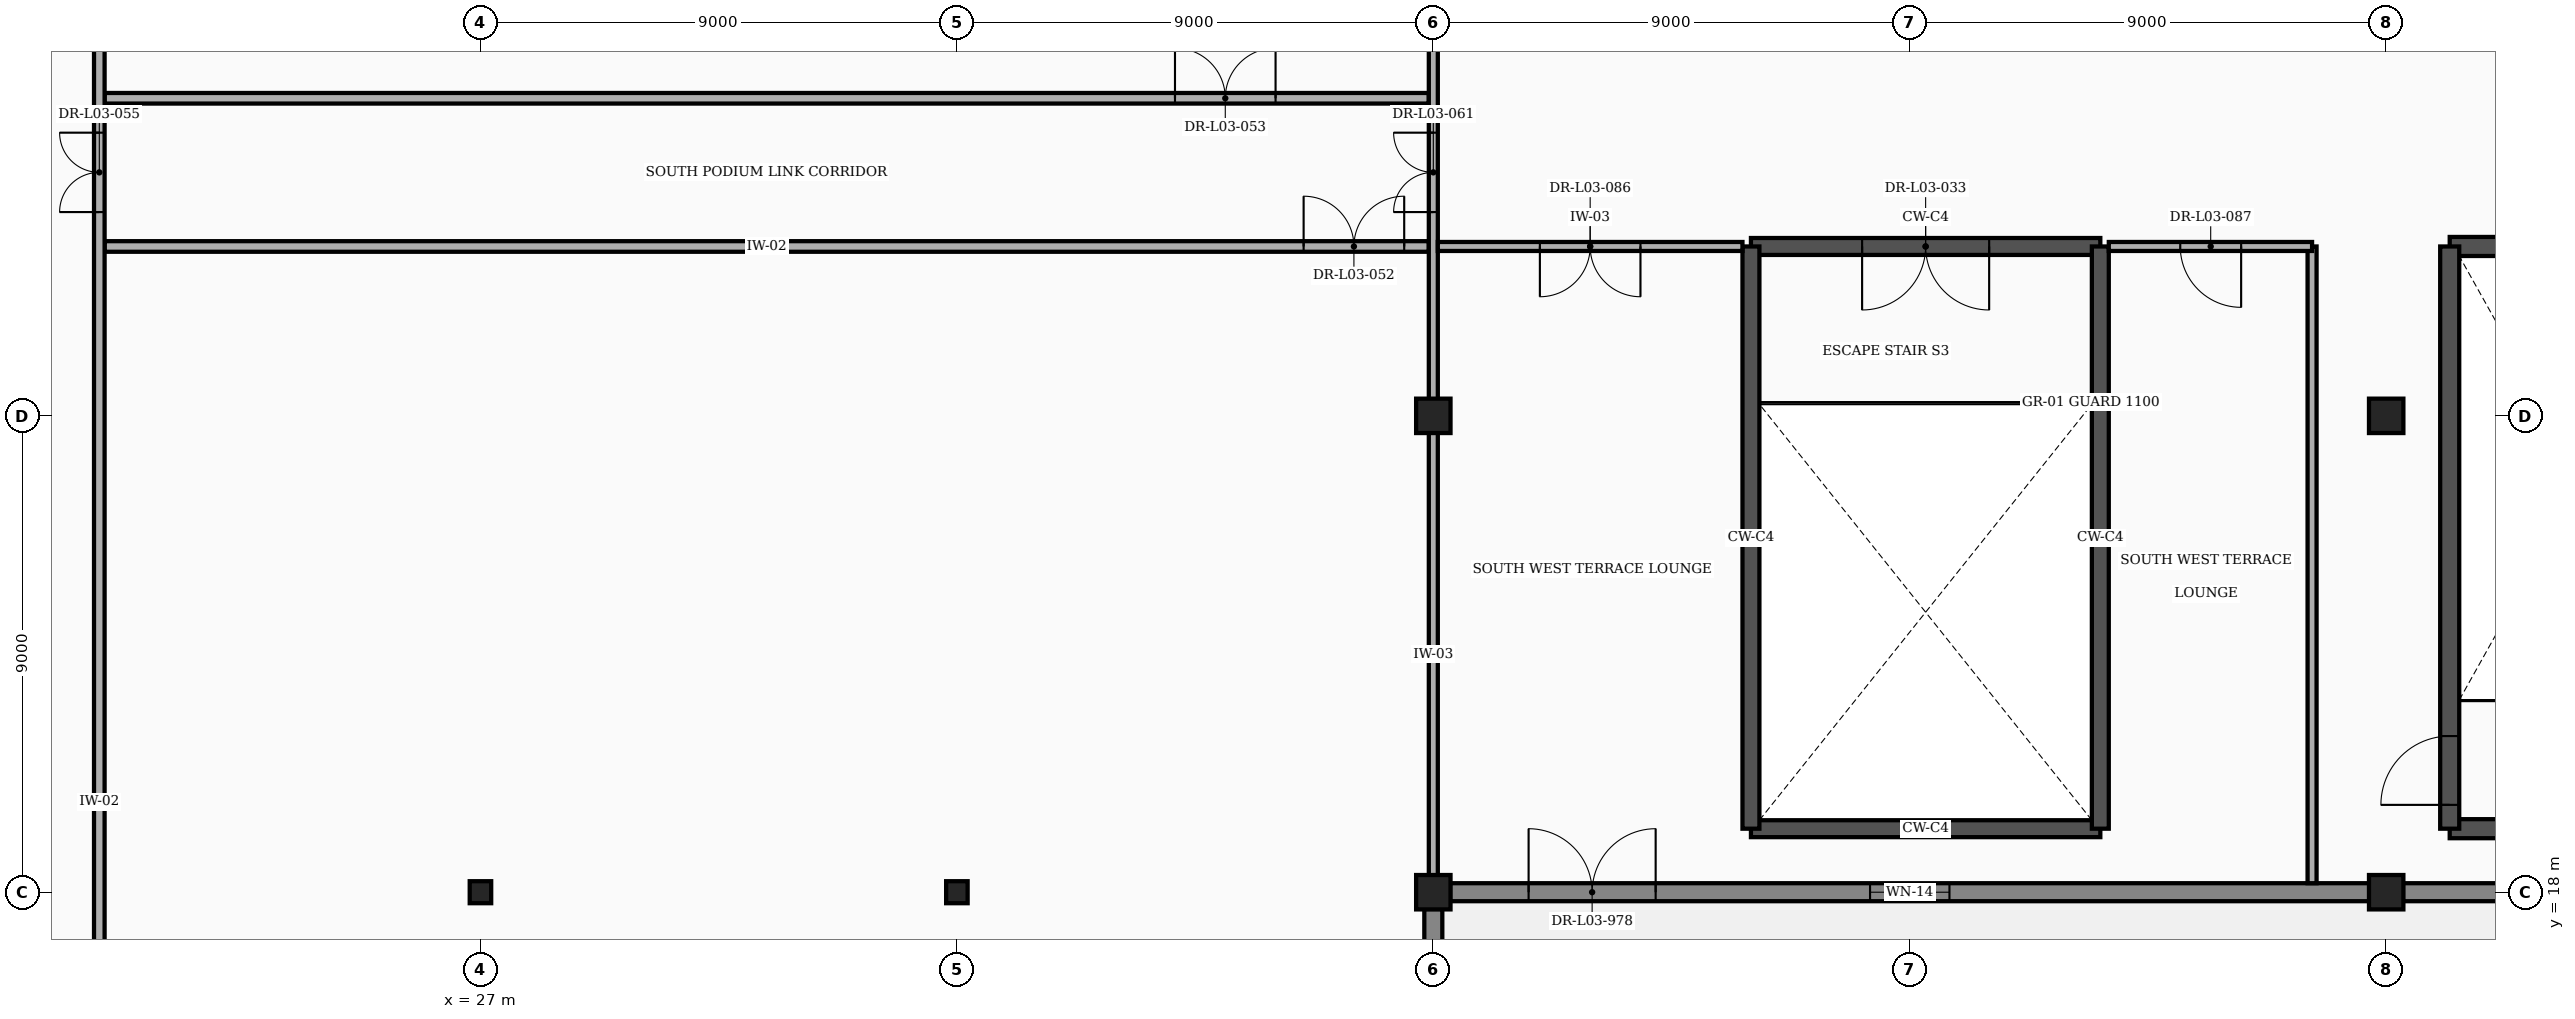
"""IFC4 building model, lengths in metres.
Left out: names, types, materials, properties, quantities, classifications, styles, units other than length and angle.
Written with IfcOpenShell. Run it as: python <this file> out.ifc"""

import sys

from ifc_helpers import new_model, si_unit, direction, frame, frame_2d, origin, origin_2d, place, context, subcontext, project, spatial, rectangle, i_section, extrude, element, fill, save


model = new_model("IFC4")
c1 = context("Model", 3, precision=1e-05, world=origin(), true_north=direction((0.0, 1.0)))
c2 = subcontext(c1, "Body", "Model", "MODEL_VIEW")
j1 = project(units=[si_unit("LENGTHUNIT", "METRE"), si_unit("PLANEANGLEUNIT", "RADIAN")], contexts=[c1])
p1 = place(None, origin())
s1 = spatial("IfcSite", under=j1, at=p1, CompositionType="ELEMENT")
p2 = place(p1, origin())
s2 = spatial("IfcBuilding", under=s1, at=p2, CompositionType="ELEMENT")
p3 = place(p2, frame((0.0, 0.0, 16.8)))
s3 = spatial("IfcBuildingStorey", under=s2, at=p3, CompositionType="ELEMENT", Elevation=16.8)
for number, where, z_axis, x_axis in (
    (1, (27.0, 18.0, 0.0), (0.0, 0.0, 1.0), (1.0, 0.0, 0.0)),
    (2, (36.0, 18.0, 0.0), (0.0, 0.0, 1.0), (1.0, 0.0, 0.0)),
):
    element("IfcColumn", number, at=place(p3, frame(where, z_axis=z_axis, x_axis=x_axis)), inside=s3, PredefinedType="COLUMN", context=c2, shape_type="SweptSolid", body=[
        extrude(i_section(OverallWidth=0.406, OverallDepth=0.416, WebThickness=0.03, FlangeThickness=0.048, at=origin_2d()), origin(), (0.0, 0.0, 1.0), 4.8),
    ])
for number, where, z_axis, x_axis in (
    (3, (45.0, 18.0, 0.0), (0.0, 0.0, 1.0), (1.0, 0.0, 0.0)),
    (4, (45.0, 27.0, 0.0), (0.0, 0.0, 1.0), (1.0, 0.0, 0.0)),
    (5, (63.0, 18.0, 0.0), (0.0, 0.0, 1.0), (1.0, 0.0, 0.0)),
    (6, (63.0, 27.0, 0.0), (0.0, 0.0, 1.0), (1.0, 0.0, 0.0)),
):
    element("IfcColumn", number, at=place(p3, frame(where, z_axis=z_axis, x_axis=x_axis)), inside=s3, PredefinedType="COLUMN", context=c2, shape_type="SweptSolid", body=[
        extrude(rectangle(XDim=0.65, YDim=0.65, at=origin_2d()), origin(), (0.0, 0.0, 1.0), 4.8),
    ])
p4 = place(p3, frame((45.317, 18.0, 0.0), z_axis=(0.0, 0.0, 1.0), x_axis=(1.0, 0.0, 0.0)))
e7 = element("IfcWall", 7, at=p4, inside=s3, PredefinedType="STANDARD", context=c2, shape_type="SweptSolid", body=[
    extrude(rectangle(XDim=17.366, YDim=0.34, at=frame_2d((8.683, 0.0))), origin(), (0.0, 0.0, 1.0), 4.195),
])
p5 = place(p4, frame((7.933, 0.0, 0.85)))
e8 = element("IfcOpeningElement", 8, at=p5, cuts=e7, PredefinedType="OPENING", context=c2, shape_type="SweptSolid", body=[
    extrude(rectangle(XDim=1.5, YDim=1.8, at=frame_2d((0.75, 0.9))), frame((0.0, 0.182, 0.0), z_axis=(0.0, -1.0, 0.0), x_axis=(1.0, 0.0, 0.0)), (0.0, 0.0, 1.0), 0.364),
])
p6 = place(p4, frame((1.483, 0.0, 0.0)))
e9 = element("IfcOpeningElement", 9, at=p6, cuts=e7, PredefinedType="OPENING", context=c2, shape_type="SweptSolid", body=[
    extrude(rectangle(XDim=2.4, YDim=2.35, at=frame_2d((1.2, 1.175))), frame((0.0, 0.182, 0.0), z_axis=(0.0, -1.0, 0.0), x_axis=(1.0, 0.0, 0.0)), (0.0, 0.0, 1.0), 0.364),
])
p7 = place(p3, frame((63.317, 18.0, 0.0), z_axis=(0.0, 0.0, 1.0), x_axis=(1.0, 0.0, 0.0)))
e10 = element("IfcWall", 10, at=p7, inside=s3, PredefinedType="STANDARD", context=c2, shape_type="SweptSolid", body=[
    extrude(rectangle(XDim=17.366, YDim=0.34, at=frame_2d((8.683, 0.0))), origin(), (0.0, 0.0, 1.0), 4.195),
])
p8 = place(p7, frame((7.783, 0.0, 0.0)))
e11 = element("IfcOpeningElement", 11, at=p8, cuts=e10, PredefinedType="OPENING", context=c2, shape_type="SweptSolid", body=[
    extrude(rectangle(XDim=1.8, YDim=2.3, at=frame_2d((0.9, 1.15))), frame((0.0, 0.182, 0.0), z_axis=(0.0, -1.0, 0.0), x_axis=(1.0, 0.0, 0.0)), (0.0, 0.0, 1.0), 0.364),
])
p9 = place(p7, frame((11.433, 0.0, 0.0)))
e12 = element("IfcOpeningElement", 12, at=p9, cuts=e10, PredefinedType="OPENING", context=c2, shape_type="SweptSolid", body=[
    extrude(rectangle(XDim=4.5, YDim=2.5, at=frame_2d((2.25, 1.25))), frame((0.0, 0.182, 0.0), z_axis=(0.0, -1.0, 0.0), x_axis=(1.0, 0.0, 0.0)), (0.0, 0.0, 1.0), 0.364),
])
p10 = place(p3, frame((45.0, 9.317, 0.0), z_axis=(0.0, 0.0, 1.0), x_axis=(0.0, 1.0, 0.0)))
e13 = element("IfcWall", 13, at=p10, inside=s3, PredefinedType="STANDARD", context=c2, shape_type="SweptSolid", body=[
    extrude(rectangle(XDim=8.366, YDim=0.34, at=frame_2d((4.183, 0.0))), origin(), (0.0, 0.0, 1.0), 4.555),
])
p11 = place(p10, frame((2.883, 0.0, 0.85)))
e14 = element("IfcOpeningElement", 14, at=p11, cuts=e13, PredefinedType="OPENING", context=c2, shape_type="SweptSolid", body=[
    extrude(rectangle(XDim=2.6, YDim=2.2, at=frame_2d((1.3, 1.1))), frame((0.0, 0.182, 0.0), z_axis=(0.0, -1.0, 0.0), x_axis=(1.0, 0.0, 0.0)), (0.0, 0.0, 1.0), 0.364),
])
for number, where, z_axis, x_axis in (
    (15, (64.2, 19.2, 0.0), (0.0, 0.0, 1.0), (1.0, 0.0, 0.0)),
    (16, (64.2, 30.2, 0.0), (0.0, 0.0, 1.0), (1.0, 0.0, 0.0)),
):
    element("IfcWall", number, at=place(p3, frame(where, z_axis=z_axis, x_axis=x_axis)), inside=s3, PredefinedType="SHEAR", context=c2, shape_type="SweptSolid", body=[
        extrude(rectangle(XDim=6.6, YDim=0.36, at=frame_2d((3.3, 0.0))), origin(), (0.0, 0.0, 1.0), 4.555),
    ])
p12 = place(p3, frame((64.2, 19.2, 0.0), z_axis=(0.0, 0.0, 1.0), x_axis=(0.0, 1.0, 0.0)))
e17 = element("IfcWall", 17, at=p12, inside=s3, PredefinedType="SHEAR", context=c2, shape_type="SweptSolid", body=[
    extrude(rectangle(XDim=11.0, YDim=0.36, at=frame_2d((5.5, 0.0))), origin(), (0.0, 0.0, 1.0), 4.555),
])
p13 = place(p12, frame((0.45, 0.0, 0.0)))
e18 = element("IfcOpeningElement", 18, at=p13, cuts=e17, PredefinedType="OPENING", context=c2, shape_type="SweptSolid", body=[
    extrude(rectangle(XDim=1.3, YDim=2.2, at=frame_2d((0.65, 1.1))), frame((0.0, 0.192, 0.0), z_axis=(0.0, -1.0, 0.0), x_axis=(1.0, 0.0, 0.0)), (0.0, 0.0, 1.0), 0.384),
])
p14 = place(p3, frame((51.0, 19.2, 0.0), z_axis=(0.0, 0.0, 1.0), x_axis=(1.0, 0.0, 0.0)))
e19 = element("IfcWall", 19, at=p14, inside=s3, PredefinedType="SHEAR", context=c2, shape_type="SweptSolid", body=[
    extrude(rectangle(XDim=6.6, YDim=0.32, at=frame_2d((3.3, 0.0))), origin(), (0.0, 0.0, 1.0), 4.555),
])
p15 = place(p3, frame((51.0, 30.2, 0.0), z_axis=(0.0, 0.0, 1.0), x_axis=(1.0, 0.0, 0.0)))
e20 = element("IfcWall", 20, at=p15, inside=s3, PredefinedType="SHEAR", context=c2, shape_type="SweptSolid", body=[
    extrude(rectangle(XDim=6.6, YDim=0.32, at=frame_2d((3.3, 0.0))), origin(), (0.0, 0.0, 1.0), 4.555),
])
p16 = place(p15, frame((2.1, 0.0, 0.0)))
e21 = element("IfcOpeningElement", 21, at=p16, cuts=e20, PredefinedType="OPENING", context=c2, shape_type="SweptSolid", body=[
    extrude(rectangle(XDim=2.4, YDim=2.25, at=frame_2d((1.2, 1.125))), frame((0.0, 0.172, 0.0), z_axis=(0.0, -1.0, 0.0), x_axis=(1.0, 0.0, 0.0)), (0.0, 0.0, 1.0), 0.344),
])
for number, where, z_axis, x_axis in (
    (22, (51.0, 19.2, 0.0), (0.0, 0.0, 1.0), (0.0, 1.0, 0.0)),
    (23, (57.6, 19.2, 0.0), (0.0, 0.0, 1.0), (0.0, 1.0, 0.0)),
):
    element("IfcWall", number, at=place(p3, frame(where, z_axis=z_axis, x_axis=x_axis)), inside=s3, PredefinedType="SHEAR", context=c2, shape_type="SweptSolid", body=[
        extrude(rectangle(XDim=11.0, YDim=0.32, at=frame_2d((5.5, 0.0))), origin(), (0.0, 0.0, 1.0), 4.555),
    ])
p17 = place(p3, frame((19.9, 30.2, 0.0), z_axis=(0.0, 0.0, 1.0), x_axis=(1.0, 0.0, 0.0)))
e24 = element("IfcWall", 24, at=p17, inside=s3, PredefinedType="PARTITIONING", context=c2, shape_type="SweptSolid", body=[
    extrude(rectangle(XDim=25.015, YDim=0.2, at=frame_2d((12.508, 0.0))), origin(), (0.0, 0.0, 1.0), 4.555),
])
p18 = place(p17, frame((22.65, 0.0, 0.0)))
e25 = element("IfcOpeningElement", 25, at=p18, cuts=e24, PredefinedType="OPENING", context=c2, shape_type="SweptSolid", body=[
    extrude(rectangle(XDim=1.9, YDim=2.35, at=frame_2d((0.95, 1.175))), frame((0.0, 0.112, 0.0), z_axis=(0.0, -1.0, 0.0), x_axis=(1.0, 0.0, 0.0)), (0.0, 0.0, 1.0), 0.224),
])
p19 = place(p3, frame((19.9, 33.0, 0.0), z_axis=(0.0, 0.0, 1.0), x_axis=(1.0, 0.0, 0.0)))
e26 = element("IfcWall", 26, at=p19, inside=s3, PredefinedType="PARTITIONING", context=c2, shape_type="SweptSolid", body=[
    extrude(rectangle(XDim=25.015, YDim=0.2, at=frame_2d((12.508, 0.0))), origin(), (0.0, 0.0, 1.0), 4.555),
])
p20 = place(p19, frame((20.22, 0.0, 0.0)))
e27 = element("IfcOpeningElement", 27, at=p20, cuts=e26, PredefinedType="OPENING", context=c2, shape_type="SweptSolid", body=[
    extrude(rectangle(XDim=1.9, YDim=2.35, at=frame_2d((0.95, 1.175))), frame((0.0, 0.112, 0.0), z_axis=(0.0, -1.0, 0.0), x_axis=(1.0, 0.0, 0.0)), (0.0, 0.0, 1.0), 0.224),
])
p21 = place(p3, frame((19.8, 0.17, 0.0), z_axis=(0.0, 0.0, 1.0), x_axis=(0.0, 1.0, 0.0)))
e28 = element("IfcWall", 28, at=p21, inside=s3, PredefinedType="PARTITIONING", context=c2, shape_type="SweptSolid", body=[
    extrude(rectangle(XDim=39.07, YDim=0.2, at=frame_2d((19.535, 0.0))), origin(), (0.0, 0.0, 1.0), 4.555),
])
p22 = place(p21, frame((13.98, 0.0, 0.0)))
e29 = element("IfcOpeningElement", 29, at=p22, cuts=e28, PredefinedType="OPENING", context=c2, shape_type="SweptSolid", body=[
    extrude(rectangle(XDim=1.9, YDim=2.35, at=frame_2d((0.95, 1.175))), frame((0.0, 0.112, 0.0), z_axis=(0.0, -1.0, 0.0), x_axis=(1.0, 0.0, 0.0)), (0.0, 0.0, 1.0), 0.224),
])
p23 = place(p21, frame((30.68, 0.0, 0.0)))
e30 = element("IfcOpeningElement", 30, at=p23, cuts=e28, PredefinedType="OPENING", context=c2, shape_type="SweptSolid", body=[
    extrude(rectangle(XDim=1.5, YDim=2.2, at=frame_2d((0.75, 1.1))), frame((0.0, 0.112, 0.0), z_axis=(0.0, -1.0, 0.0), x_axis=(1.0, 0.0, 0.0)), (0.0, 0.0, 1.0), 0.224),
])
p24 = place(p21, frame((36.68, 0.0, 0.0)))
e31 = element("IfcOpeningElement", 31, at=p24, cuts=e28, PredefinedType="OPENING", context=c2, shape_type="SweptSolid", body=[
    extrude(rectangle(XDim=1.9, YDim=2.35, at=frame_2d((0.95, 1.175))), frame((0.0, 0.112, 0.0), z_axis=(0.0, -1.0, 0.0), x_axis=(1.0, 0.0, 0.0)), (0.0, 0.0, 1.0), 0.224),
])
p25 = place(p3, frame((45.0, 18.22, 0.0), z_axis=(0.0, 0.0, 1.0), x_axis=(0.0, 1.0, 0.0)))
e32 = element("IfcWall", 32, at=p25, inside=s3, PredefinedType="PARTITIONING", context=c2, shape_type="SweptSolid", body=[
    extrude(rectangle(XDim=8.56, YDim=0.17, at=frame_2d((4.28, 0.0))), origin(), (0.0, 0.0, 1.0), 4.002),
])
p26 = place(p3, frame((45.0, 27.22, 0.0), z_axis=(0.0, 0.0, 1.0), x_axis=(0.0, 1.0, 0.0)))
e33 = element("IfcWall", 33, at=p26, inside=s3, PredefinedType="PARTITIONING", context=c2, shape_type="SweptSolid", body=[
    extrude(rectangle(XDim=8.56, YDim=0.17, at=frame_2d((4.28, 0.0))), origin(), (0.0, 0.0, 1.0), 4.258),
])
p27 = place(p26, frame((3.63, 0.0, 0.0)))
e34 = element("IfcOpeningElement", 34, at=p27, cuts=e33, PredefinedType="OPENING", context=c2, shape_type="SweptSolid", body=[
    extrude(rectangle(XDim=1.5, YDim=2.2, at=frame_2d((0.75, 1.1))), frame((0.0, 0.097, 0.0), z_axis=(0.0, -1.0, 0.0), x_axis=(1.0, 0.0, 0.0)), (0.0, 0.0, 1.0), 0.194),
])
p28 = place(p3, frame((61.6, 18.17, 0.0), z_axis=(0.0, 0.0, 1.0), x_axis=(0.0, 1.0, 0.0)))
e35 = element("IfcWall", 35, at=p28, inside=s3, PredefinedType="PARTITIONING", context=c2, shape_type="SweptSolid", body=[
    extrude(rectangle(XDim=12.03, YDim=0.17, at=frame_2d((6.015, 0.0))), origin(), (0.0, 0.0, 1.0), 4.555),
])
p29 = place(p3, frame((45.085, 30.2, 0.0), z_axis=(0.0, 0.0, 1.0), x_axis=(1.0, 0.0, 0.0)))
e36 = element("IfcWall", 36, at=p29, inside=s3, PredefinedType="PARTITIONING", context=c2, shape_type="SweptSolid", body=[
    extrude(rectangle(XDim=5.755, YDim=0.17, at=frame_2d((2.877, 0.0))), origin(), (0.0, 0.0, 1.0), 4.555),
])
p30 = place(p29, frame((1.928, 0.0, 0.0)))
e37 = element("IfcOpeningElement", 37, at=p30, cuts=e36, PredefinedType="OPENING", context=c2, shape_type="SweptSolid", body=[
    extrude(rectangle(XDim=1.9, YDim=2.35, at=frame_2d((0.95, 1.175))), frame((0.0, 0.097, 0.0), z_axis=(0.0, -1.0, 0.0), x_axis=(1.0, 0.0, 0.0)), (0.0, 0.0, 1.0), 0.194),
])
p31 = place(p3, frame((57.76, 30.2, 0.0), z_axis=(0.0, 0.0, 1.0), x_axis=(1.0, 0.0, 0.0)))
e38 = element("IfcWall", 38, at=p31, inside=s3, PredefinedType="PARTITIONING", context=c2, shape_type="SweptSolid", body=[
    extrude(rectangle(XDim=3.84, YDim=0.17, at=frame_2d((1.92, 0.0))), origin(), (0.0, 0.0, 1.0), 4.555),
])
p32 = place(p31, frame((1.35, 0.0, 0.0)))
e39 = element("IfcOpeningElement", 39, at=p32, cuts=e38, PredefinedType="OPENING", context=c2, shape_type="SweptSolid", body=[
    extrude(rectangle(XDim=1.15, YDim=2.15, at=frame_2d((0.575, 1.075))), frame((0.0, 0.097, 0.0), z_axis=(0.0, -1.0, 0.0), x_axis=(1.0, 0.0, 0.0)), (0.0, 0.0, 1.0), 0.194),
])
p33 = place(p5, origin())
e40 = element("IfcWindow", 40, at=p33, inside=s3, PartitioningType="SINGLE_PANEL", PredefinedType="WINDOW", context=c2, shape_type="SweptSolid", body=[
    extrude(rectangle(XDim=1.5, YDim=1.8, at=frame_2d((0.75, 0.9))), frame((0.0, 0.03, 0.0), z_axis=(0.0, -1.0, 0.0), x_axis=(1.0, 0.0, 0.0)), (0.0, 0.0, 1.0), 0.06),
])
fill(e8, e40)
p34 = place(p6, origin())
e41 = element("IfcDoor", 41, at=p34, inside=s3, OperationType="DOUBLE_DOOR_SINGLE_SWING", PredefinedType="DOOR", context=c2, shape_type="SweptSolid", body=[
    extrude(rectangle(XDim=2.4, YDim=2.35, at=frame_2d((1.2, 1.175))), frame((0.0, 0.025, 0.0), z_axis=(0.0, -1.0, 0.0), x_axis=(1.0, 0.0, 0.0)), (0.0, 0.0, 1.0), 0.05),
])
fill(e9, e41)
p35 = place(p13, origin())
e42 = element("IfcDoor", 42, at=p35, inside=s3, OperationType="SINGLE_SWING_LEFT", PredefinedType="DOOR", context=c2, shape_type="SweptSolid", body=[
    extrude(rectangle(XDim=1.3, YDim=2.2, at=frame_2d((0.65, 1.1))), frame((0.0, 0.025, 0.0), z_axis=(0.0, -1.0, 0.0), x_axis=(1.0, 0.0, 0.0)), (0.0, 0.0, 1.0), 0.05),
])
fill(e18, e42)
p36 = place(p16, frame((2.4, 0.0, 0.0), z_axis=(0.0, 0.0, 1.0), x_axis=(-1.0, 0.0, 0.0)))
e43 = element("IfcDoor", 43, at=p36, inside=s3, OperationType="DOUBLE_DOOR_SINGLE_SWING", PredefinedType="DOOR", context=c2, shape_type="SweptSolid", body=[
    extrude(rectangle(XDim=2.4, YDim=2.25, at=frame_2d((1.2, 1.125))), frame((0.0, 0.025, 0.0), z_axis=(0.0, -1.0, 0.0), x_axis=(1.0, 0.0, 0.0)), (0.0, 0.0, 1.0), 0.05),
])
fill(e21, e43)
p37 = place(p18, origin())
e44 = element("IfcDoor", 44, at=p37, inside=s3, OperationType="DOUBLE_DOOR_SINGLE_SWING", PredefinedType="DOOR", context=c2, shape_type="SweptSolid", body=[
    extrude(rectangle(XDim=1.9, YDim=2.35, at=frame_2d((0.95, 1.175))), frame((0.0, 0.025, 0.0), z_axis=(0.0, -1.0, 0.0), x_axis=(1.0, 0.0, 0.0)), (0.0, 0.0, 1.0), 0.05),
])
fill(e25, e44)
p38 = place(p20, origin())
e45 = element("IfcDoor", 45, at=p38, inside=s3, OperationType="DOUBLE_DOOR_SINGLE_SWING", PredefinedType="DOOR", context=c2, shape_type="SweptSolid", body=[
    extrude(rectangle(XDim=1.9, YDim=2.35, at=frame_2d((0.95, 1.175))), frame((0.0, 0.025, 0.0), z_axis=(0.0, -1.0, 0.0), x_axis=(1.0, 0.0, 0.0)), (0.0, 0.0, 1.0), 0.05),
])
fill(e27, e45)
p39 = place(p23, origin())
e46 = element("IfcDoor", 46, at=p39, inside=s3, OperationType="DOUBLE_DOOR_SINGLE_SWING", PredefinedType="DOOR", context=c2, shape_type="SweptSolid", body=[
    extrude(rectangle(XDim=1.5, YDim=2.2, at=frame_2d((0.75, 1.1))), frame((0.0, 0.025, 0.0), z_axis=(0.0, -1.0, 0.0), x_axis=(1.0, 0.0, 0.0)), (0.0, 0.0, 1.0), 0.05),
])
fill(e30, e46)
p40 = place(p27, origin())
e47 = element("IfcDoor", 47, at=p40, inside=s3, OperationType="DOUBLE_DOOR_SINGLE_SWING", PredefinedType="DOOR", context=c2, shape_type="SweptSolid", body=[
    extrude(rectangle(XDim=1.5, YDim=2.2, at=frame_2d((0.75, 1.1))), frame((0.0, 0.025, 0.0), z_axis=(0.0, -1.0, 0.0), x_axis=(1.0, 0.0, 0.0)), (0.0, 0.0, 1.0), 0.05),
])
fill(e34, e47)
p41 = place(p30, frame((1.9, 0.0, 0.0), z_axis=(0.0, 0.0, 1.0), x_axis=(-1.0, 0.0, 0.0)))
e48 = element("IfcDoor", 48, at=p41, inside=s3, OperationType="DOUBLE_DOOR_SINGLE_SWING", PredefinedType="DOOR", context=c2, shape_type="SweptSolid", body=[
    extrude(rectangle(XDim=1.9, YDim=2.35, at=frame_2d((0.95, 1.175))), frame((0.0, 0.025, 0.0), z_axis=(0.0, -1.0, 0.0), x_axis=(1.0, 0.0, 0.0)), (0.0, 0.0, 1.0), 0.05),
])
fill(e37, e48)
p42 = place(p32, frame((1.15, 0.0, 0.0), z_axis=(0.0, 0.0, 1.0), x_axis=(-1.0, 0.0, 0.0)))
e49 = element("IfcDoor", 49, at=p42, inside=s3, OperationType="SINGLE_SWING_LEFT", PredefinedType="DOOR", context=c2, shape_type="SweptSolid", body=[
    extrude(rectangle(XDim=1.15, YDim=2.15, at=frame_2d((0.575, 1.075))), frame((0.0, 0.025, 0.0), z_axis=(0.0, -1.0, 0.0), x_axis=(1.0, 0.0, 0.0)), (0.0, 0.0, 1.0), 0.05),
])
fill(e39, e49)
save(model, sys.argv[1])
